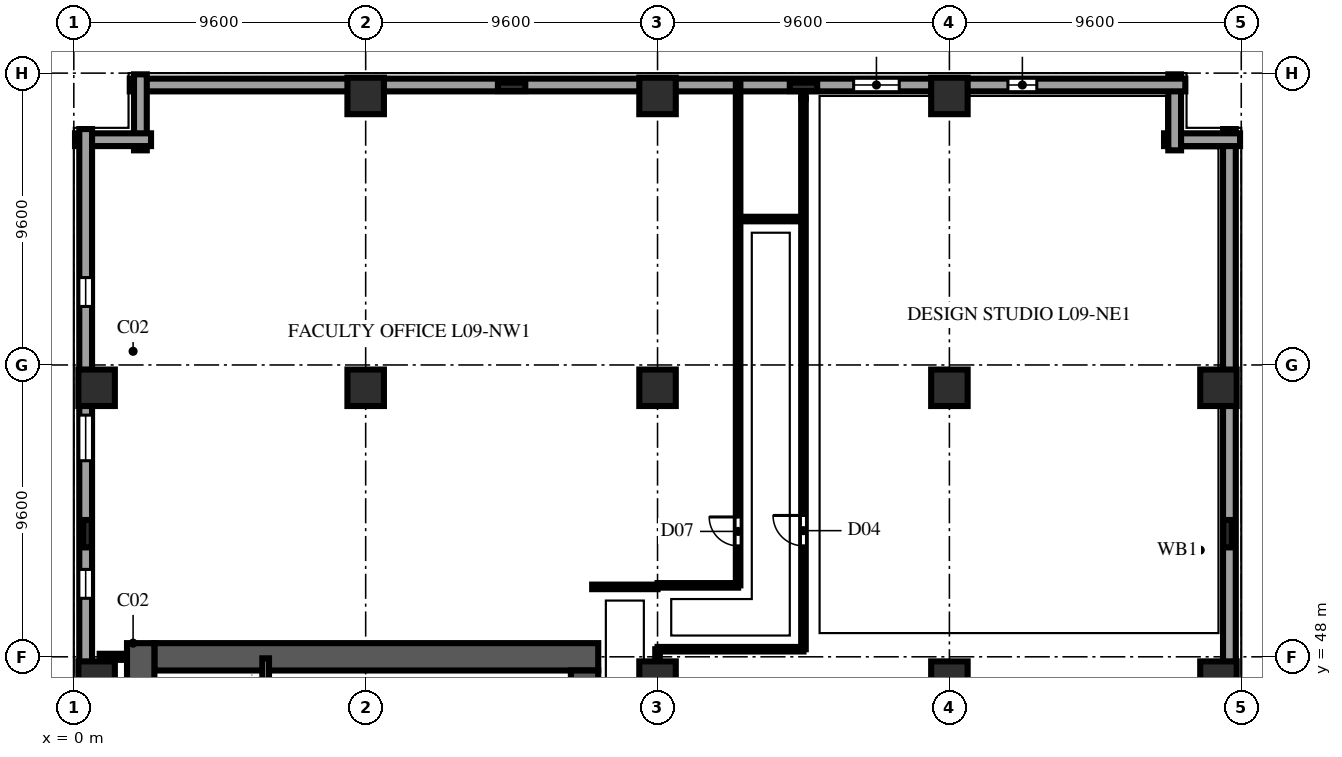
"""IFC4 building model, lengths in metres.
Left out: names, types, materials, properties, quantities, classifications, styles, units other than length and angle.
Written with IfcOpenShell. Run it as: python <this file> out.ifc"""

import sys

from ifc_helpers import new_model, si_unit, direction, frame, frame_2d, origin, origin_2d, place, context, subcontext, project, spatial, rectangle, extrude, element, fill, save


model = new_model("IFC4")
c1 = context("Model", 3, precision=1e-05, world=origin(), true_north=direction((0.0, 1.0)))
c2 = subcontext(c1, "Body", "Model", "MODEL_VIEW")
j1 = project(units=[si_unit("LENGTHUNIT", "METRE"), si_unit("PLANEANGLEUNIT", "RADIAN")], contexts=[c1])
p1 = place(None, origin())
s1 = spatial("IfcSite", under=j1, at=p1, CompositionType="ELEMENT")
p2 = place(p1, origin())
s2 = spatial("IfcBuilding", under=s1, at=p2, CompositionType="ELEMENT")
p3 = place(p2, frame((0.0, 0.0, 39.4)))
s3 = spatial("IfcBuildingStorey", under=s2, at=p3, CompositionType="ELEMENT", Elevation=39.4)
p4 = place(p3, frame((2.65, 48.0, 0.0), z_axis=(0.0, 0.0, 1.0), x_axis=(1.0, 0.0, 0.0)))
e1 = element("IfcWall", 1, at=p4, inside=s3, PredefinedType="SHEAR", context=c2, shape_type="SweptSolid", body=[
    extrude(rectangle(XDim=14.6, YDim=0.9, at=frame_2d((7.3, 0.0))), origin(), (0.0, 0.0, 1.0), 3.54),
])
p5 = place(p3, frame((2.2, 9.15, 0.0), z_axis=(0.0, 0.0, 1.0), x_axis=(0.0, 1.0, 0.0)))
e2 = element("IfcWall", 2, at=p5, inside=s3, PredefinedType="SHEAR", context=c2, shape_type="SweptSolid", body=[
    extrude(rectangle(XDim=39.3, YDim=0.9, at=frame_2d((19.65, 0.0))), origin(), (0.0, 0.0, 1.0), 3.54),
])
p6 = place(p3, frame((16.8, 36.4, 0.0), z_axis=(0.0, 0.0, 1.0), x_axis=(0.0, 1.0, 0.0)))
e3 = element("IfcWall", 3, at=p6, inside=s3, PredefinedType="SHEAR", context=c2, shape_type="SweptSolid", body=[
    extrude(rectangle(XDim=11.15, YDim=0.9, at=frame_2d((5.575, 0.0))), origin(), (0.0, 0.0, 1.0), 3.54),
])
p7 = place(p6, frame((9.2, 0.0, 0.0)))
e4 = element("IfcOpeningElement", 4, at=p7, cuts=e3, PredefinedType="OPENING", context=c2, shape_type="SweptSolid", body=[
    extrude(rectangle(XDim=0.95, YDim=2.15, at=frame_2d((0.475, 1.075))), frame((0.0, 0.462, 0.0), z_axis=(0.0, -1.0, 0.0), x_axis=(1.0, 0.0, 0.0)), (0.0, 0.0, 1.0), 0.924),
])
for number, where, z_axis, x_axis in (
    (5, (0.75, 47.25, 0.0), (0.0, 0.0, 1.0), (1.0, 0.0, 0.0)),
    (6, (0.75, 56.85, 0.0), (0.0, 0.0, 1.0), (1.0, 0.0, 0.0)),
    (7, (9.6, 56.85, 0.0), (0.0, 0.0, 1.0), (1.0, 0.0, 0.0)),
    (8, (9.6, 66.45, 0.0), (0.0, 0.0, 1.0), (1.0, 0.0, 0.0)),
    (9, (19.2, 47.25, 0.0), (0.0, 0.0, 1.0), (1.0, 0.0, 0.0)),
    (10, (19.2, 56.85, 0.0), (0.0, 0.0, 1.0), (1.0, 0.0, 0.0)),
    (11, (19.2, 66.45, 0.0), (0.0, 0.0, 1.0), (1.0, 0.0, 0.0)),
    (12, (28.8, 47.25, 0.0), (0.0, 0.0, 1.0), (1.0, 0.0, 0.0)),
    (13, (28.8, 56.85, 0.0), (0.0, 0.0, 1.0), (1.0, 0.0, 0.0)),
    (14, (28.8, 66.45, 0.0), (0.0, 0.0, 1.0), (1.0, 0.0, 0.0)),
    (15, (37.65, 47.25, 0.0), (0.0, 0.0, 1.0), (1.0, 0.0, 0.0)),
    (16, (37.65, 56.85, 0.0), (0.0, 0.0, 1.0), (1.0, 0.0, 0.0)),
):
    element("IfcColumn", number, at=place(p3, frame(where, z_axis=z_axis, x_axis=x_axis)), inside=s3, PredefinedType="COLUMN", context=c2, shape_type="SweptSolid", body=[
        extrude(rectangle(XDim=1.2, YDim=1.2, at=origin_2d()), origin(), (0.0, 0.0, 1.0), 3.8),
    ])
for number, where, z_axis, x_axis in (
    (17, (0.45, 52.05, 0.0), (0.0, 0.0, 1.0), (0.0, 1.0, 0.0)),
    (18, (14.4, 66.75, 0.0), (0.0, 0.0, 1.0), (1.0, 0.0, 0.0)),
    (19, (24.0, 66.75, 0.0), (0.0, 0.0, 1.0), (1.0, 0.0, 0.0)),
    (20, (37.95, 52.05, 0.0), (0.0, 0.0, 1.0), (0.0, 1.0, 0.0)),
):
    element("IfcColumn", number, at=place(p3, frame(where, z_axis=z_axis, x_axis=x_axis)), inside=s3, PredefinedType="PILASTER", context=c2, shape_type="SweptSolid", body=[
        extrude(rectangle(XDim=0.9, YDim=0.28, at=origin_2d()), origin(), (0.0, 0.0, 1.0), 3.8),
    ])
p8 = place(p3, frame((38.01, 37.66, 0.0), z_axis=(0.0, 0.0, 1.0), x_axis=(0.0, 1.0, 0.0)))
e21 = element("IfcWall", 21, at=p8, inside=s3, PredefinedType="SOLIDWALL", context=c2, shape_type="SweptSolid", body=[
    extrude(rectangle(XDim=27.7, YDim=0.42, at=frame_2d((13.85, 0.0))), origin(), (0.0, 0.0, 1.0), 3.54),
])
for number, where, z_axis, x_axis in (
    (22, (38.36, 65.01, 0.0), (0.0, 0.0, 1.0), (-1.0, 0.0, 0.0)),
    (23, (36.21, 64.66, 0.0), (0.0, 0.0, 1.0), (0.0, 1.0, 0.0)),
):
    element("IfcWall", number, at=place(p3, frame(where, z_axis=z_axis, x_axis=x_axis)), inside=s3, PredefinedType="SOLIDWALL", context=c2, shape_type="SweptSolid", body=[
        extrude(rectangle(XDim=2.5, YDim=0.42, at=frame_2d((1.25, 0.0))), origin(), (0.0, 0.0, 1.0), 3.54),
    ])
p9 = place(p3, frame((36.56, 66.81, 0.0), z_axis=(0.0, 0.0, 1.0), x_axis=(-1.0, 0.0, 0.0)))
e24 = element("IfcWall", 24, at=p9, inside=s3, PredefinedType="SOLIDWALL", context=c2, shape_type="SweptSolid", body=[
    extrude(rectangle(XDim=34.72, YDim=0.42, at=frame_2d((17.36, 0.0))), origin(), (0.0, 0.0, 1.0), 3.54),
])
p10 = place(p9, frame((4.885, 0.0, 0.9)))
e25 = element("IfcOpeningElement", 25, at=p10, cuts=e24, PredefinedType="OPENING", context=c2, shape_type="SweptSolid", body=[
    extrude(rectangle(XDim=0.95, YDim=1.85, at=frame_2d((0.475, 0.925))), frame((0.0, 0.222, 0.0), z_axis=(0.0, -1.0, 0.0), x_axis=(1.0, 0.0, 0.0)), (0.0, 0.0, 1.0), 0.444),
])
p11 = place(p9, frame((9.41, 0.0, 0.9)))
e26 = element("IfcOpeningElement", 26, at=p11, cuts=e24, PredefinedType="OPENING", context=c2, shape_type="SweptSolid", body=[
    extrude(rectangle(XDim=1.5, YDim=1.85, at=frame_2d((0.75, 0.925))), frame((0.0, 0.222, 0.0), z_axis=(0.0, -1.0, 0.0), x_axis=(1.0, 0.0, 0.0)), (0.0, 0.0, 1.0), 0.444),
])
for number, where, z_axis, x_axis in (
    (27, (2.19, 67.16, 0.0), (0.0, 0.0, 1.0), (0.0, -1.0, 0.0)),
    (28, (2.54, 65.01, 0.0), (0.0, 0.0, 1.0), (-1.0, 0.0, 0.0)),
):
    element("IfcWall", number, at=place(p3, frame(where, z_axis=z_axis, x_axis=x_axis)), inside=s3, PredefinedType="SOLIDWALL", context=c2, shape_type="SweptSolid", body=[
        extrude(rectangle(XDim=2.5, YDim=0.42, at=frame_2d((1.25, 0.0))), origin(), (0.0, 0.0, 1.0), 3.54),
    ])
p12 = place(p3, frame((0.39, 65.36, 0.0), z_axis=(0.0, 0.0, 1.0), x_axis=(0.0, -1.0, 0.0)))
e29 = element("IfcWall", 29, at=p12, inside=s3, PredefinedType="SOLIDWALL", context=c2, shape_type="SweptSolid", body=[
    extrude(rectangle(XDim=63.52, YDim=0.42, at=frame_2d((31.76, 0.0))), origin(), (0.0, 0.0, 1.0), 3.54),
])
p13 = place(p12, frame((4.885, 0.0, 0.9)))
e30 = element("IfcOpeningElement", 30, at=p13, cuts=e29, PredefinedType="OPENING", context=c2, shape_type="SweptSolid", body=[
    extrude(rectangle(XDim=0.95, YDim=1.85, at=frame_2d((0.475, 0.925))), frame((0.0, 0.222, 0.0), z_axis=(0.0, -1.0, 0.0), x_axis=(1.0, 0.0, 0.0)), (0.0, 0.0, 1.0), 0.444),
])
p14 = place(p12, frame((9.41, 0.0, 0.9)))
e31 = element("IfcOpeningElement", 31, at=p14, cuts=e29, PredefinedType="OPENING", context=c2, shape_type="SweptSolid", body=[
    extrude(rectangle(XDim=1.5, YDim=1.85, at=frame_2d((0.75, 0.925))), frame((0.0, 0.222, 0.0), z_axis=(0.0, -1.0, 0.0), x_axis=(1.0, 0.0, 0.0)), (0.0, 0.0, 1.0), 0.444),
])
p15 = place(p12, frame((14.485, 0.0, 0.9)))
e32 = element("IfcOpeningElement", 32, at=p15, cuts=e29, PredefinedType="OPENING", context=c2, shape_type="SweptSolid", body=[
    extrude(rectangle(XDim=0.95, YDim=1.85, at=frame_2d((0.475, 0.925))), frame((0.0, 0.222, 0.0), z_axis=(0.0, -1.0, 0.0), x_axis=(1.0, 0.0, 0.0)), (0.0, 0.0, 1.0), 0.444),
])
p16 = place(p12, frame((19.01, 0.0, 0.9)))
e33 = element("IfcOpeningElement", 33, at=p16, cuts=e29, PredefinedType="OPENING", context=c2, shape_type="SweptSolid", body=[
    extrude(rectangle(XDim=1.5, YDim=1.85, at=frame_2d((0.75, 0.925))), frame((0.0, 0.222, 0.0), z_axis=(0.0, -1.0, 0.0), x_axis=(1.0, 0.0, 0.0)), (0.0, 0.0, 1.0), 0.444),
])
p17 = place(p12, frame((24.085, 0.0, 0.9)))
e34 = element("IfcOpeningElement", 34, at=p17, cuts=e29, PredefinedType="OPENING", context=c2, shape_type="SweptSolid", body=[
    extrude(rectangle(XDim=0.95, YDim=1.85, at=frame_2d((0.475, 0.925))), frame((0.0, 0.222, 0.0), z_axis=(0.0, -1.0, 0.0), x_axis=(1.0, 0.0, 0.0)), (0.0, 0.0, 1.0), 0.444),
])
p18 = place(p12, frame((28.61, 0.0, 0.9)))
e35 = element("IfcOpeningElement", 35, at=p18, cuts=e29, PredefinedType="OPENING", context=c2, shape_type="SweptSolid", body=[
    extrude(rectangle(XDim=1.5, YDim=1.85, at=frame_2d((0.75, 0.925))), frame((0.0, 0.222, 0.0), z_axis=(0.0, -1.0, 0.0), x_axis=(1.0, 0.0, 0.0)), (0.0, 0.0, 1.0), 0.444),
])
p19 = place(p12, frame((33.685, 0.0, 0.9)))
e36 = element("IfcOpeningElement", 36, at=p19, cuts=e29, PredefinedType="OPENING", context=c2, shape_type="SweptSolid", body=[
    extrude(rectangle(XDim=0.95, YDim=1.85, at=frame_2d((0.475, 0.925))), frame((0.0, 0.222, 0.0), z_axis=(0.0, -1.0, 0.0), x_axis=(1.0, 0.0, 0.0)), (0.0, 0.0, 1.0), 0.444),
])
p20 = place(p12, frame((38.21, 0.0, 0.9)))
e37 = element("IfcOpeningElement", 37, at=p20, cuts=e29, PredefinedType="OPENING", context=c2, shape_type="SweptSolid", body=[
    extrude(rectangle(XDim=1.5, YDim=1.85, at=frame_2d((0.75, 0.925))), frame((0.0, 0.222, 0.0), z_axis=(0.0, -1.0, 0.0), x_axis=(1.0, 0.0, 0.0)), (0.0, 0.0, 1.0), 0.444),
])
p21 = place(p12, frame((43.285, 0.0, 0.9)))
e38 = element("IfcOpeningElement", 38, at=p21, cuts=e29, PredefinedType="OPENING", context=c2, shape_type="SweptSolid", body=[
    extrude(rectangle(XDim=0.95, YDim=1.85, at=frame_2d((0.475, 0.925))), frame((0.0, 0.222, 0.0), z_axis=(0.0, -1.0, 0.0), x_axis=(1.0, 0.0, 0.0)), (0.0, 0.0, 1.0), 0.444),
])
p22 = place(p12, frame((47.81, 0.0, 0.9)))
e39 = element("IfcOpeningElement", 39, at=p22, cuts=e29, PredefinedType="OPENING", context=c2, shape_type="SweptSolid", body=[
    extrude(rectangle(XDim=1.5, YDim=1.85, at=frame_2d((0.75, 0.925))), frame((0.0, 0.222, 0.0), z_axis=(0.0, -1.0, 0.0), x_axis=(1.0, 0.0, 0.0)), (0.0, 0.0, 1.0), 0.444),
])
p23 = place(p12, frame((52.885, 0.0, 0.9)))
e40 = element("IfcOpeningElement", 40, at=p23, cuts=e29, PredefinedType="OPENING", context=c2, shape_type="SweptSolid", body=[
    extrude(rectangle(XDim=0.95, YDim=1.85, at=frame_2d((0.475, 0.925))), frame((0.0, 0.222, 0.0), z_axis=(0.0, -1.0, 0.0), x_axis=(1.0, 0.0, 0.0)), (0.0, 0.0, 1.0), 0.444),
])
p24 = place(p12, frame((57.41, 0.0, 0.9)))
e41 = element("IfcOpeningElement", 41, at=p24, cuts=e29, PredefinedType="OPENING", context=c2, shape_type="SweptSolid", body=[
    extrude(rectangle(XDim=1.5, YDim=1.85, at=frame_2d((0.75, 0.925))), frame((0.0, 0.222, 0.0), z_axis=(0.0, -1.0, 0.0), x_axis=(1.0, 0.0, 0.0)), (0.0, 0.0, 1.0), 0.444),
])
p25 = place(p3, frame((6.31, 40.14, 0.0), z_axis=(0.0, 0.0, 1.0), x_axis=(0.0, 1.0, 0.0)))
e42 = element("IfcWall", 42, at=p25, inside=s3, PredefinedType="SOLIDWALL", context=c2, shape_type="SweptSolid", body=[
    extrude(rectangle(XDim=7.81, YDim=0.22, at=frame_2d((3.905, 0.0))), origin(), (0.0, 0.0, 1.0), 3.54),
])
p26 = place(p3, frame((0.85, 48.0, 0.0), z_axis=(0.0, 0.0, 1.0), x_axis=(1.0, 0.0, 0.0)))
e43 = element("IfcWall", 43, at=p26, inside=s3, PredefinedType="SOLIDWALL", context=c2, shape_type="SweptSolid", body=[
    extrude(rectangle(XDim=0.895, YDim=0.2, at=frame_2d((0.448, 0.0))), origin(), (0.0, 0.0, 1.0), 3.54),
])
p27 = place(p3, frame((17.05, 50.3, 0.0), z_axis=(0.0, 0.0, 1.0), x_axis=(1.0, 0.0, 0.0)))
e44 = element("IfcWall", 44, at=p27, inside=s3, PredefinedType="PARTITIONING", context=c2, shape_type="SweptSolid", body=[
    extrude(rectangle(XDim=2.15, YDim=0.15, at=frame_2d((1.075, 0.0))), origin(), (0.0, 0.0, 1.0), 3.54),
])
p28 = place(p3, frame((19.2, 23.45, 0.0), z_axis=(0.0, 0.0, 1.0), x_axis=(0.0, 1.0, 0.0)))
e45 = element("IfcWall", 45, at=p28, inside=s3, PredefinedType="PARTITIONING", context=c2, shape_type="SweptSolid", body=[
    extrude(rectangle(XDim=24.8, YDim=0.15, at=frame_2d((12.4, 0.0))), origin(), (0.0, 0.0, 1.0), 3.123),
])
p29 = place(p28, frame((9.35, 0.0, 0.0)))
e46 = element("IfcOpeningElement", 46, at=p29, cuts=e45, PredefinedType="OPENING", context=c2, shape_type="SweptSolid", body=[
    extrude(rectangle(XDim=0.95, YDim=2.15, at=frame_2d((0.475, 1.075))), frame((0.0, 0.087, 0.0), z_axis=(0.0, -1.0, 0.0), x_axis=(1.0, 0.0, 0.0)), (0.0, 0.0, 1.0), 0.174),
])
p30 = place(p3, frame((19.2, 48.25, 0.0), z_axis=(0.0, 0.0, 1.0), x_axis=(1.0, 0.0, 0.0)))
e47 = element("IfcWall", 47, at=p30, inside=s3, PredefinedType="PARTITIONING", context=c2, shape_type="SweptSolid", body=[
    extrude(rectangle(XDim=4.8, YDim=0.15, at=frame_2d((2.4, 0.0))), origin(), (0.0, 0.0, 1.0), 3.54),
])
p31 = place(p3, frame((19.2, 50.35, 0.0), z_axis=(0.0, 0.0, 1.0), x_axis=(1.0, 0.0, 0.0)))
e48 = element("IfcWall", 48, at=p31, inside=s3, PredefinedType="PARTITIONING", context=c2, shape_type="SweptSolid", body=[
    extrude(rectangle(XDim=2.65, YDim=0.15, at=frame_2d((1.325, 0.0))), origin(), (0.0, 0.0, 1.0), 3.54),
])
p32 = place(p3, frame((21.85, 62.4, 0.0), z_axis=(0.0, 0.0, 1.0), x_axis=(1.0, 0.0, 0.0)))
e49 = element("IfcWall", 49, at=p32, inside=s3, PredefinedType="PARTITIONING", context=c2, shape_type="SweptSolid", body=[
    extrude(rectangle(XDim=2.15, YDim=0.15, at=frame_2d((1.075, 0.0))), origin(), (0.0, 0.0, 1.0), 3.54),
])
p33 = place(p3, frame((24.0, 48.25, 0.0), z_axis=(0.0, 0.0, 1.0), x_axis=(0.0, 1.0, 0.0)))
e50 = element("IfcWall", 50, at=p33, inside=s3, PredefinedType="PARTITIONING", context=c2, shape_type="SweptSolid", body=[
    extrude(rectangle(XDim=18.11, YDim=0.15, at=frame_2d((9.055, 0.0))), origin(), (0.0, 0.0, 1.0), 3.133),
])
p34 = place(p33, frame((3.4, 0.0, 0.0)))
e51 = element("IfcOpeningElement", 51, at=p34, cuts=e50, PredefinedType="OPENING", context=c2, shape_type="SweptSolid", body=[
    extrude(rectangle(XDim=1.0, YDim=2.2, at=frame_2d((0.5, 1.1))), frame((0.0, 0.087, 0.0), z_axis=(0.0, -1.0, 0.0), x_axis=(1.0, 0.0, 0.0)), (0.0, 0.0, 1.0), 0.174),
])
p35 = place(p3, frame((24.0, 66.36, 0.0), z_axis=(0.0, 0.0, 1.0), x_axis=(0.0, 1.0, 0.0)))
e52 = element("IfcWall", 52, at=p35, inside=s3, PredefinedType="PARTITIONING", context=c2, shape_type="SweptSolid", body=[
    extrude(rectangle(XDim=0.62, YDim=0.15, at=frame_2d((0.31, 0.0))), origin(), (0.0, 0.0, 1.0), 3.54),
])
p36 = place(p3, frame((21.85, 50.35, 0.0), z_axis=(0.0, 0.0, 1.0), x_axis=(0.0, 1.0, 0.0)))
e53 = element("IfcWall", 53, at=p36, inside=s3, PredefinedType="PARTITIONING", context=c2, shape_type="SweptSolid", body=[
    extrude(rectangle(XDim=16.63, YDim=0.15, at=frame_2d((8.315, 0.0))), origin(), (0.0, 0.0, 1.0), 3.54),
])
p37 = place(p36, frame((1.3, 0.0, 0.0)))
e54 = element("IfcOpeningElement", 54, at=p37, cuts=e53, PredefinedType="OPENING", context=c2, shape_type="SweptSolid", body=[
    extrude(rectangle(XDim=0.95, YDim=2.15, at=frame_2d((0.475, 1.075))), frame((0.0, 0.087, 0.0), z_axis=(0.0, -1.0, 0.0), x_axis=(1.0, 0.0, 0.0)), (0.0, 0.0, 1.0), 0.174),
])
p38 = place(p10, origin())
e55 = element("IfcWindow", 55, at=p38, inside=s3, PartitioningType="SINGLE_PANEL", PredefinedType="WINDOW", context=c2, shape_type="SweptSolid", body=[
    extrude(rectangle(XDim=0.95, YDim=1.85, at=frame_2d((0.475, 0.925))), frame((0.0, 0.11, 0.0), z_axis=(0.0, -1.0, 0.0), x_axis=(1.0, 0.0, 0.0)), (0.0, 0.0, 1.0), 0.06),
])
fill(e25, e55)
p39 = place(p11, origin())
e56 = element("IfcWindow", 56, at=p39, inside=s3, PartitioningType="DOUBLE_PANEL_VERTICAL", PredefinedType="WINDOW", context=c2, shape_type="SweptSolid", body=[
    extrude(rectangle(XDim=1.5, YDim=1.85, at=frame_2d((0.75, 0.925))), frame((0.0, 0.11, 0.0), z_axis=(0.0, -1.0, 0.0), x_axis=(1.0, 0.0, 0.0)), (0.0, 0.0, 1.0), 0.06),
])
fill(e26, e56)
p40 = place(p13, origin())
e57 = element("IfcWindow", 57, at=p40, inside=s3, PartitioningType="SINGLE_PANEL", PredefinedType="WINDOW", context=c2, shape_type="SweptSolid", body=[
    extrude(rectangle(XDim=0.95, YDim=1.85, at=frame_2d((0.475, 0.925))), frame((0.0, 0.11, 0.0), z_axis=(0.0, -1.0, 0.0), x_axis=(1.0, 0.0, 0.0)), (0.0, 0.0, 1.0), 0.06),
])
fill(e30, e57)
p41 = place(p14, origin())
e58 = element("IfcWindow", 58, at=p41, inside=s3, PartitioningType="DOUBLE_PANEL_VERTICAL", PredefinedType="WINDOW", context=c2, shape_type="SweptSolid", body=[
    extrude(rectangle(XDim=1.5, YDim=1.85, at=frame_2d((0.75, 0.925))), frame((0.0, 0.11, 0.0), z_axis=(0.0, -1.0, 0.0), x_axis=(1.0, 0.0, 0.0)), (0.0, 0.0, 1.0), 0.06),
])
fill(e31, e58)
p42 = place(p15, origin())
e59 = element("IfcWindow", 59, at=p42, inside=s3, PartitioningType="SINGLE_PANEL", PredefinedType="WINDOW", context=c2, shape_type="SweptSolid", body=[
    extrude(rectangle(XDim=0.95, YDim=1.85, at=frame_2d((0.475, 0.925))), frame((0.0, 0.11, 0.0), z_axis=(0.0, -1.0, 0.0), x_axis=(1.0, 0.0, 0.0)), (0.0, 0.0, 1.0), 0.06),
])
fill(e32, e59)
p43 = place(p34, origin())
e60 = element("IfcDoor", 60, at=p43, inside=s3, OperationType="SINGLE_SWING_RIGHT", PredefinedType="DOOR", context=c2, shape_type="SweptSolid", body=[
    extrude(rectangle(XDim=1.0, YDim=2.2, at=frame_2d((0.5, 1.1))), frame((0.0, 0.025, 0.0), z_axis=(0.0, -1.0, 0.0), x_axis=(1.0, 0.0, 0.0)), (0.0, 0.0, 1.0), 0.05),
])
fill(e51, e60)
p44 = place(p37, origin())
e61 = element("IfcDoor", 61, at=p44, inside=s3, OperationType="SINGLE_SWING_RIGHT", PredefinedType="DOOR", context=c2, shape_type="SweptSolid", body=[
    extrude(rectangle(XDim=0.95, YDim=2.15, at=frame_2d((0.475, 1.075))), frame((0.0, 0.025, 0.0), z_axis=(0.0, -1.0, 0.0), x_axis=(1.0, 0.0, 0.0)), (0.0, 0.0, 1.0), 0.05),
])
fill(e54, e61)
save(model, sys.argv[1])
